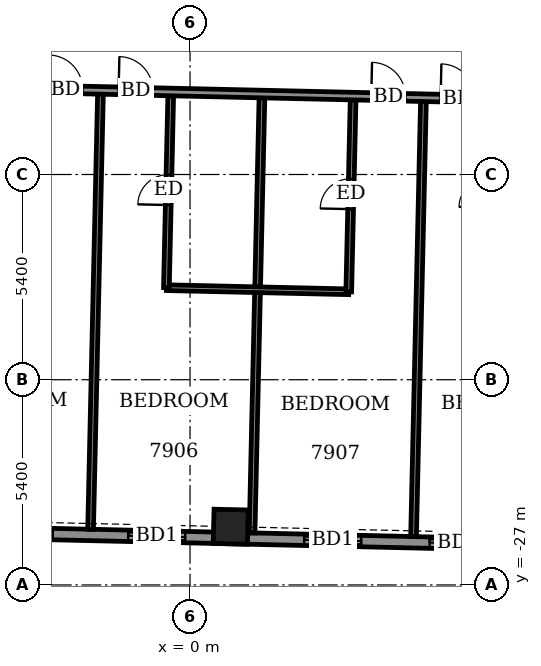
"""IFC4 building model, lengths in metres.
Left out: names, types, materials, properties, quantities, classifications, styles, units other than length and angle.
Written with IfcOpenShell. Run it as: python <this file> out.ifc"""

import sys

from ifc_helpers import new_model, si_unit, direction, frame, frame_2d, origin, origin_2d, place, context, subcontext, project, spatial, rectangle, extrude, element, fill, save


model = new_model("IFC4")
c1 = context("Model", 3, precision=1e-05, world=origin(), true_north=direction((0.0, 1.0)))
c2 = subcontext(c1, "Body", "Model", "MODEL_VIEW")
j1 = project(units=[si_unit("LENGTHUNIT", "METRE"), si_unit("PLANEANGLEUNIT", "RADIAN")], contexts=[c1])
p1 = place(None, origin())
s1 = spatial("IfcSite", under=j1, at=p1, CompositionType="ELEMENT")
p2 = place(p1, origin())
s2 = spatial("IfcBuilding", under=s1, at=p2, CompositionType="ELEMENT")
p3 = place(p2, frame((0.0, 0.0, 309.7)))
s3 = spatial("IfcBuildingStorey", under=s2, at=p3, CompositionType="ELEMENT", Elevation=309.7)
p4 = place(p3, frame((1.071, -25.467, -0.55), z_axis=(0.0, 0.0, 1.0), x_axis=(0.999741800516, -0.02272294656, 0.0)))
e1 = element("IfcColumn", 1, at=p4, inside=s3, PredefinedType="COLUMN", context=c2, shape_type="SweptSolid", body=[
    extrude(rectangle(XDim=0.9, YDim=0.9, at=origin_2d()), origin(), (0.0, 0.0, 1.0), 3.6),
])
p5 = place(p3, frame((-28.264, -25.102, 0.0), z_axis=(0.0, 0.0, 1.0), x_axis=(0.999742520573, -0.022691244094, 0.0)))
e2 = element("IfcWall", 2, at=p5, inside=s3, PredefinedType="SOLIDWALL", context=c2, shape_type="SweptSolid", body=[
    extrude(rectangle(XDim=51.3, YDim=0.3, at=frame_2d((25.65, 0.0))), origin(), (0.0, 0.0, 1.0), 2.5),
])
p6 = place(p5, frame((1.654, 0.0, 0.0)))
e3 = element("IfcOpeningElement", 3, at=p6, cuts=e2, PredefinedType="OPENING", context=c2, shape_type="SweptSolid", body=[
    extrude(rectangle(XDim=1.5, YDim=2.4, at=frame_2d((0.75, 1.2))), frame((0.0, 0.16, 0.0), z_axis=(0.0, -1.0, 0.0), x_axis=(1.0, 0.0, 0.0)), (0.0, 0.0, 1.0), 0.32),
])
p7 = place(p5, frame((4.936, 0.0, 0.0)))
e4 = element("IfcOpeningElement", 4, at=p7, cuts=e2, PredefinedType="OPENING", context=c2, shape_type="SweptSolid", body=[
    extrude(rectangle(XDim=1.5, YDim=2.4, at=frame_2d((0.75, 1.2))), frame((0.0, 0.16, 0.0), z_axis=(0.0, -1.0, 0.0), x_axis=(1.0, 0.0, 0.0)), (0.0, 0.0, 1.0), 0.32),
])
p8 = place(p5, frame((9.975, 0.0, 0.0)))
e5 = element("IfcOpeningElement", 5, at=p8, cuts=e2, PredefinedType="OPENING", context=c2, shape_type="SweptSolid", body=[
    extrude(rectangle(XDim=1.5, YDim=2.4, at=frame_2d((0.75, 1.2))), frame((0.0, 0.16, 0.0), z_axis=(0.0, -1.0, 0.0), x_axis=(1.0, 0.0, 0.0)), (0.0, 0.0, 1.0), 0.32),
])
p9 = place(p5, frame((15.196, 0.0, 0.0)))
e6 = element("IfcOpeningElement", 6, at=p9, cuts=e2, PredefinedType="OPENING", context=c2, shape_type="SweptSolid", body=[
    extrude(rectangle(XDim=1.5, YDim=2.4, at=frame_2d((0.75, 1.2))), frame((0.0, 0.16, 0.0), z_axis=(0.0, -1.0, 0.0), x_axis=(1.0, 0.0, 0.0)), (0.0, 0.0, 1.0), 0.32),
])
p10 = place(p5, frame((18.5, 0.0, 0.0)))
e7 = element("IfcOpeningElement", 7, at=p10, cuts=e2, PredefinedType="OPENING", context=c2, shape_type="SweptSolid", body=[
    extrude(rectangle(XDim=1.5, YDim=2.4, at=frame_2d((0.75, 1.2))), frame((0.0, 0.16, 0.0), z_axis=(0.0, -1.0, 0.0), x_axis=(1.0, 0.0, 0.0)), (0.0, 0.0, 1.0), 0.32),
])
p11 = place(p5, frame((23.157, 0.0, 0.0)))
e8 = element("IfcOpeningElement", 8, at=p11, cuts=e2, PredefinedType="OPENING", context=c2, shape_type="SweptSolid", body=[
    extrude(rectangle(XDim=1.5, YDim=2.4, at=frame_2d((0.75, 1.2))), frame((0.0, 0.16, 0.0), z_axis=(0.0, -1.0, 0.0), x_axis=(1.0, 0.0, 0.0)), (0.0, 0.0, 1.0), 0.32),
])
p12 = place(p5, frame((26.643, 0.0, 0.0)))
e9 = element("IfcOpeningElement", 9, at=p12, cuts=e2, PredefinedType="OPENING", context=c2, shape_type="SweptSolid", body=[
    extrude(rectangle(XDim=1.5, YDim=2.4, at=frame_2d((0.75, 1.2))), frame((0.0, 0.16, 0.0), z_axis=(0.0, -1.0, 0.0), x_axis=(1.0, 0.0, 0.0)), (0.0, 0.0, 1.0), 0.32),
])
p13 = place(p5, frame((31.275, 0.0, 0.0)))
e10 = element("IfcOpeningElement", 10, at=p13, cuts=e2, PredefinedType="OPENING", context=c2, shape_type="SweptSolid", body=[
    extrude(rectangle(XDim=1.5, YDim=2.4, at=frame_2d((0.75, 1.2))), frame((0.0, 0.16, 0.0), z_axis=(0.0, -1.0, 0.0), x_axis=(1.0, 0.0, 0.0)), (0.0, 0.0, 1.0), 0.32),
])
p14 = place(p5, frame((34.578, 0.0, 0.0)))
e11 = element("IfcOpeningElement", 11, at=p14, cuts=e2, PredefinedType="OPENING", context=c2, shape_type="SweptSolid", body=[
    extrude(rectangle(XDim=1.5, YDim=2.4, at=frame_2d((0.75, 1.2))), frame((0.0, 0.16, 0.0), z_axis=(0.0, -1.0, 0.0), x_axis=(1.0, 0.0, 0.0)), (0.0, 0.0, 1.0), 0.32),
])
p15 = place(p5, frame((39.75, 0.0, 0.0)))
e12 = element("IfcOpeningElement", 12, at=p15, cuts=e2, PredefinedType="OPENING", context=c2, shape_type="SweptSolid", body=[
    extrude(rectangle(XDim=1.5, YDim=2.4, at=frame_2d((0.75, 1.2))), frame((0.0, 0.16, 0.0), z_axis=(0.0, -1.0, 0.0), x_axis=(1.0, 0.0, 0.0)), (0.0, 0.0, 1.0), 0.32),
])
p16 = place(p5, frame((44.839, 0.0, 0.0)))
e13 = element("IfcOpeningElement", 13, at=p16, cuts=e2, PredefinedType="OPENING", context=c2, shape_type="SweptSolid", body=[
    extrude(rectangle(XDim=1.5, YDim=2.4, at=frame_2d((0.75, 1.2))), frame((0.0, 0.16, 0.0), z_axis=(0.0, -1.0, 0.0), x_axis=(1.0, 0.0, 0.0)), (0.0, 0.0, 1.0), 0.32),
])
p17 = place(p5, frame((47.628, 0.0, 0.9)))
e14 = element("IfcOpeningElement", 14, at=p17, cuts=e2, PredefinedType="OPENING", context=c2, shape_type="SweptSolid", body=[
    extrude(rectangle(XDim=2.4, YDim=1.5, at=frame_2d((1.2, 0.75))), frame((0.0, 0.16, 0.0), z_axis=(0.0, -1.0, 0.0), x_axis=(1.0, 0.0, 0.0)), (0.0, 0.0, 1.0), 0.32),
])
p18 = place(p3, frame((-2.617, -25.534, 0.0), z_axis=(0.0, 0.0, 1.0), x_axis=(0.022708327922, 0.999742132674, 0.0)))
e15 = element("IfcWall", 15, at=p18, inside=s3, PredefinedType="PARTITIONING", context=c2, shape_type="SweptSolid", body=[
    extrude(rectangle(XDim=11.45, YDim=0.15, at=frame_2d((5.725, 0.0))), origin(), (0.0, 0.0, 1.0), 2.5),
])
p19 = place(p3, frame((1.632, -25.63, 0.0), z_axis=(0.0, 0.0, 1.0), x_axis=(0.022708812003, 0.999742121678, 0.0)))
e16 = element("IfcWall", 16, at=p19, inside=s3, PredefinedType="PARTITIONING", context=c2, shape_type="SweptSolid", body=[
    extrude(rectangle(XDim=11.45, YDim=0.15, at=frame_2d((5.725, 0.0))), origin(), (0.0, 0.0, 1.0), 2.5),
])
p20 = place(p3, frame((5.881, -25.727, 0.0), z_axis=(0.0, 0.0, 1.0), x_axis=(0.022708327922, 0.999742132674, 0.0)))
e17 = element("IfcWall", 17, at=p20, inside=s3, PredefinedType="PARTITIONING", context=c2, shape_type="SweptSolid", body=[
    extrude(rectangle(XDim=11.45, YDim=0.15, at=frame_2d((5.725, 0.0))), origin(), (0.0, 0.0, 1.0), 2.5),
])
p21 = place(p3, frame((-0.622, -19.178, 0.0), z_axis=(0.0, 0.0, 1.0), x_axis=(0.999747191239, -0.022484519337, 0.0)))
e18 = element("IfcWall", 18, at=p21, inside=s3, PredefinedType="PARTITIONING", context=c2, shape_type="SweptSolid", body=[
    extrude(rectangle(XDim=4.799, YDim=0.15, at=frame_2d((2.4, 0.0))), origin(), (0.0, 0.0, 1.0), 3.05),
])
p22 = place(p3, frame((-0.622, -19.178, 0.0), z_axis=(0.0, 0.0, 1.0), x_axis=(0.02257535817, 0.999745144126, 0.0)))
e19 = element("IfcWall", 19, at=p22, inside=s3, PredefinedType="PARTITIONING", context=c2, shape_type="SweptSolid", body=[
    extrude(rectangle(XDim=5.05, YDim=0.15, at=frame_2d((2.525, 0.0))), origin(), (0.0, 0.0, 1.0), 3.05),
])
p23 = place(p22, frame((2.175, 0.0, 0.0)))
e20 = element("IfcOpeningElement", 20, at=p23, cuts=e19, PredefinedType="OPENING", context=c2, shape_type="SweptSolid", body=[
    extrude(rectangle(XDim=0.8, YDim=2.1, at=frame_2d((0.4, 1.05))), frame((0.0, 0.085, 0.0), z_axis=(0.0, -1.0, 0.0), x_axis=(1.0, 0.0, 0.0)), (0.0, 0.0, 1.0), 0.17),
])
p24 = place(p3, frame((4.176, -19.286, 0.0), z_axis=(0.0, 0.0, 1.0), x_axis=(0.022774126501, 0.999740635946, 0.0)))
e21 = element("IfcWall", 21, at=p24, inside=s3, PredefinedType="PARTITIONING", context=c2, shape_type="SweptSolid", body=[
    extrude(rectangle(XDim=5.049, YDim=0.15, at=frame_2d((2.524, 0.0))), origin(), (0.0, 0.0, 1.0), 3.05),
])
p25 = place(p24, frame((2.175, 0.0, 0.0)))
e22 = element("IfcOpeningElement", 22, at=p25, cuts=e21, PredefinedType="OPENING", context=c2, shape_type="SweptSolid", body=[
    extrude(rectangle(XDim=0.8, YDim=2.1, at=frame_2d((0.4, 1.05))), frame((0.0, 0.085, 0.0), z_axis=(0.0, -1.0, 0.0), x_axis=(1.0, 0.0, 0.0)), (0.0, 0.0, 1.0), 0.17),
])
p26 = place(p3, frame((-31.347, -13.329, 0.0), z_axis=(0.0, 0.0, 1.0), x_axis=(0.999742613079, -0.022687168058, 0.0)))
e23 = element("IfcWall", 23, at=p26, inside=s3, PredefinedType="PARTITIONING", context=c2, shape_type="SweptSolid", body=[
    extrude(rectangle(XDim=58.799, YDim=0.2, at=frame_2d((29.399, 0.0))), origin(), (0.0, 0.0, 1.0), 3.05),
])
p27 = place(p26, frame((1.35, 0.0, 0.0)))
e24 = element("IfcOpeningElement", 24, at=p27, cuts=e23, PredefinedType="OPENING", context=c2, shape_type="SweptSolid", body=[
    extrude(rectangle(XDim=1.0, YDim=2.1, at=frame_2d((0.5, 1.05))), frame((0.0, 0.11, 0.0), z_axis=(0.0, -1.0, 0.0), x_axis=(1.0, 0.0, 0.0)), (0.0, 0.0, 1.0), 0.22),
])
p28 = place(p26, frame((5.95, 0.0, 0.0)))
e25 = element("IfcOpeningElement", 25, at=p28, cuts=e23, PredefinedType="OPENING", context=c2, shape_type="SweptSolid", body=[
    extrude(rectangle(XDim=0.9, YDim=2.1, at=frame_2d((0.45, 1.05))), frame((0.0, 0.11, 0.0), z_axis=(0.0, -1.0, 0.0), x_axis=(1.0, 0.0, 0.0)), (0.0, 0.0, 1.0), 0.22),
])
p29 = place(p26, frame((10.575, 0.0, 0.0)))
e26 = element("IfcOpeningElement", 26, at=p29, cuts=e23, PredefinedType="OPENING", context=c2, shape_type="SweptSolid", body=[
    extrude(rectangle(XDim=0.9, YDim=2.1, at=frame_2d((0.45, 1.05))), frame((0.0, 0.11, 0.0), z_axis=(0.0, -1.0, 0.0), x_axis=(1.0, 0.0, 0.0)), (0.0, 0.0, 1.0), 0.22),
])
p30 = place(p26, frame((12.425, 0.0, 0.0)))
e27 = element("IfcOpeningElement", 27, at=p30, cuts=e23, PredefinedType="OPENING", context=c2, shape_type="SweptSolid", body=[
    extrude(rectangle(XDim=0.9, YDim=2.1, at=frame_2d((0.45, 1.05))), frame((0.0, 0.11, 0.0), z_axis=(0.0, -1.0, 0.0), x_axis=(1.0, 0.0, 0.0)), (0.0, 0.0, 1.0), 0.22),
])
p31 = place(p26, frame((19.075, 0.0, 0.0)))
e28 = element("IfcOpeningElement", 28, at=p31, cuts=e23, PredefinedType="OPENING", context=c2, shape_type="SweptSolid", body=[
    extrude(rectangle(XDim=0.9, YDim=2.1, at=frame_2d((0.45, 1.05))), frame((0.0, 0.11, 0.0), z_axis=(0.0, -1.0, 0.0), x_axis=(1.0, 0.0, 0.0)), (0.0, 0.0, 1.0), 0.22),
])
p32 = place(p26, frame((20.95, 0.0, 0.0)))
e29 = element("IfcOpeningElement", 29, at=p32, cuts=e23, PredefinedType="OPENING", context=c2, shape_type="SweptSolid", body=[
    extrude(rectangle(XDim=0.9, YDim=2.1, at=frame_2d((0.45, 1.05))), frame((0.0, 0.11, 0.0), z_axis=(0.0, -1.0, 0.0), x_axis=(1.0, 0.0, 0.0)), (0.0, 0.0, 1.0), 0.22),
])
p33 = place(p26, frame((27.625, 0.0, 0.0)))
e30 = element("IfcOpeningElement", 30, at=p33, cuts=e23, PredefinedType="OPENING", context=c2, shape_type="SweptSolid", body=[
    extrude(rectangle(XDim=0.9, YDim=2.1, at=frame_2d((0.45, 1.05))), frame((0.0, 0.11, 0.0), z_axis=(0.0, -1.0, 0.0), x_axis=(1.0, 0.0, 0.0)), (0.0, 0.0, 1.0), 0.22),
])
p34 = place(p26, frame((29.475, 0.0, 0.0)))
e31 = element("IfcOpeningElement", 31, at=p34, cuts=e23, PredefinedType="OPENING", context=c2, shape_type="SweptSolid", body=[
    extrude(rectangle(XDim=0.9, YDim=2.1, at=frame_2d((0.45, 1.05))), frame((0.0, 0.11, 0.0), z_axis=(0.0, -1.0, 0.0), x_axis=(1.0, 0.0, 0.0)), (0.0, 0.0, 1.0), 0.22),
])
p35 = place(p26, frame((36.125, 0.0, 0.0)))
e32 = element("IfcOpeningElement", 32, at=p35, cuts=e23, PredefinedType="OPENING", context=c2, shape_type="SweptSolid", body=[
    extrude(rectangle(XDim=0.9, YDim=2.1, at=frame_2d((0.45, 1.05))), frame((0.0, 0.11, 0.0), z_axis=(0.0, -1.0, 0.0), x_axis=(1.0, 0.0, 0.0)), (0.0, 0.0, 1.0), 0.22),
])
p36 = place(p26, frame((37.95, 0.0, 0.0)))
e33 = element("IfcOpeningElement", 33, at=p36, cuts=e23, PredefinedType="OPENING", context=c2, shape_type="SweptSolid", body=[
    extrude(rectangle(XDim=0.9, YDim=2.1, at=frame_2d((0.45, 1.05))), frame((0.0, 0.11, 0.0), z_axis=(0.0, -1.0, 0.0), x_axis=(1.0, 0.0, 0.0)), (0.0, 0.0, 1.0), 0.22),
])
p37 = place(p26, frame((44.6, 0.0, 0.0)))
e34 = element("IfcOpeningElement", 34, at=p37, cuts=e23, PredefinedType="OPENING", context=c2, shape_type="SweptSolid", body=[
    extrude(rectangle(XDim=0.9, YDim=2.1, at=frame_2d((0.45, 1.05))), frame((0.0, 0.11, 0.0), z_axis=(0.0, -1.0, 0.0), x_axis=(1.0, 0.0, 0.0)), (0.0, 0.0, 1.0), 0.22),
])
p38 = place(p26, frame((46.475, 0.0, 0.0)))
e35 = element("IfcOpeningElement", 35, at=p38, cuts=e23, PredefinedType="OPENING", context=c2, shape_type="SweptSolid", body=[
    extrude(rectangle(XDim=0.9, YDim=2.1, at=frame_2d((0.45, 1.05))), frame((0.0, 0.11, 0.0), z_axis=(0.0, -1.0, 0.0), x_axis=(1.0, 0.0, 0.0)), (0.0, 0.0, 1.0), 0.22),
])
p39 = place(p26, frame((55.925, 0.0, 0.0)))
e36 = element("IfcOpeningElement", 36, at=p39, cuts=e23, PredefinedType="OPENING", context=c2, shape_type="SweptSolid", body=[
    extrude(rectangle(XDim=1.0, YDim=2.1, at=frame_2d((0.5, 1.05))), frame((0.0, 0.11, 0.0), z_axis=(0.0, -1.0, 0.0), x_axis=(1.0, 0.0, 0.0)), (0.0, 0.0, 1.0), 0.22),
])
p40 = place(p26, frame((51.0, 0.0, 0.0)))
e37 = element("IfcOpeningElement", 37, at=p40, cuts=e23, PredefinedType="OPENING", context=c2, shape_type="SweptSolid", body=[
    extrude(rectangle(XDim=0.9, YDim=2.1, at=frame_2d((0.45, 1.05))), frame((0.0, 0.11, 0.0), z_axis=(0.0, -1.0, 0.0), x_axis=(1.0, 0.0, 0.0)), (0.0, 0.0, 1.0), 0.22),
])
p41 = place(p11, origin())
e38 = element("IfcDoor", 38, at=p41, inside=s3, OperationType="SLIDING_TO_LEFT", PredefinedType="DOOR", context=c2, shape_type="SweptSolid", body=[
    extrude(rectangle(XDim=1.5, YDim=2.4, at=frame_2d((0.75, 1.2))), frame((0.0, 0.025, 0.0), z_axis=(0.0, -1.0, 0.0), x_axis=(1.0, 0.0, 0.0)), (0.0, 0.0, 1.0), 0.05),
])
fill(e8, e38)
p42 = place(p12, origin())
e39 = element("IfcDoor", 39, at=p42, inside=s3, OperationType="SLIDING_TO_LEFT", PredefinedType="DOOR", context=c2, shape_type="SweptSolid", body=[
    extrude(rectangle(XDim=1.5, YDim=2.4, at=frame_2d((0.75, 1.2))), frame((0.0, 0.025, 0.0), z_axis=(0.0, -1.0, 0.0), x_axis=(1.0, 0.0, 0.0)), (0.0, 0.0, 1.0), 0.05),
])
fill(e9, e39)
p43 = place(p13, origin())
e40 = element("IfcDoor", 40, at=p43, inside=s3, OperationType="SLIDING_TO_LEFT", PredefinedType="DOOR", context=c2, shape_type="SweptSolid", body=[
    extrude(rectangle(XDim=1.5, YDim=2.4, at=frame_2d((0.75, 1.2))), frame((0.0, 0.025, 0.0), z_axis=(0.0, -1.0, 0.0), x_axis=(1.0, 0.0, 0.0)), (0.0, 0.0, 1.0), 0.05),
])
fill(e10, e40)
p44 = place(p14, origin())
e41 = element("IfcDoor", 41, at=p44, inside=s3, OperationType="SLIDING_TO_LEFT", PredefinedType="DOOR", context=c2, shape_type="SweptSolid", body=[
    extrude(rectangle(XDim=1.5, YDim=2.4, at=frame_2d((0.75, 1.2))), frame((0.0, 0.025, 0.0), z_axis=(0.0, -1.0, 0.0), x_axis=(1.0, 0.0, 0.0)), (0.0, 0.0, 1.0), 0.05),
])
fill(e11, e41)
p45 = place(p33, origin())
e42 = element("IfcDoor", 42, at=p45, inside=s3, OperationType="SINGLE_SWING_LEFT", PredefinedType="DOOR", context=c2, shape_type="SweptSolid", body=[
    extrude(rectangle(XDim=0.9, YDim=2.1, at=frame_2d((0.45, 1.05))), frame((0.0, 0.025, 0.0), z_axis=(0.0, -1.0, 0.0), x_axis=(1.0, 0.0, 0.0)), (0.0, 0.0, 1.0), 0.05),
])
fill(e30, e42)
p46 = place(p34, origin())
e43 = element("IfcDoor", 43, at=p46, inside=s3, OperationType="SINGLE_SWING_RIGHT", PredefinedType="DOOR", context=c2, shape_type="SweptSolid", body=[
    extrude(rectangle(XDim=0.9, YDim=2.1, at=frame_2d((0.45, 1.05))), frame((0.0, 0.025, 0.0), z_axis=(0.0, -1.0, 0.0), x_axis=(1.0, 0.0, 0.0)), (0.0, 0.0, 1.0), 0.05),
])
fill(e31, e43)
p47 = place(p23, origin())
e44 = element("IfcDoor", 44, at=p47, inside=s3, OperationType="SINGLE_SWING_RIGHT", PredefinedType="DOOR", context=c2, shape_type="SweptSolid", body=[
    extrude(rectangle(XDim=0.8, YDim=2.1, at=frame_2d((0.4, 1.05))), frame((0.0, 0.025, 0.0), z_axis=(0.0, -1.0, 0.0), x_axis=(1.0, 0.0, 0.0)), (0.0, 0.0, 1.0), 0.05),
])
fill(e20, e44)
p48 = place(p35, origin())
e45 = element("IfcDoor", 45, at=p48, inside=s3, OperationType="SINGLE_SWING_LEFT", PredefinedType="DOOR", context=c2, shape_type="SweptSolid", body=[
    extrude(rectangle(XDim=0.9, YDim=2.1, at=frame_2d((0.45, 1.05))), frame((0.0, 0.025, 0.0), z_axis=(0.0, -1.0, 0.0), x_axis=(1.0, 0.0, 0.0)), (0.0, 0.0, 1.0), 0.05),
])
fill(e32, e45)
p49 = place(p25, origin())
e46 = element("IfcDoor", 46, at=p49, inside=s3, OperationType="SINGLE_SWING_LEFT", PredefinedType="DOOR", context=c2, shape_type="SweptSolid", body=[
    extrude(rectangle(XDim=0.8, YDim=2.1, at=frame_2d((0.4, 1.05))), frame((0.0, 0.025, 0.0), z_axis=(0.0, -1.0, 0.0), x_axis=(1.0, 0.0, 0.0)), (0.0, 0.0, 1.0), 0.05),
])
fill(e22, e46)
p50 = place(p36, origin())
e47 = element("IfcDoor", 47, at=p50, inside=s3, OperationType="SINGLE_SWING_RIGHT", PredefinedType="DOOR", context=c2, shape_type="SweptSolid", body=[
    extrude(rectangle(XDim=0.9, YDim=2.1, at=frame_2d((0.45, 1.05))), frame((0.0, 0.025, 0.0), z_axis=(0.0, -1.0, 0.0), x_axis=(1.0, 0.0, 0.0)), (0.0, 0.0, 1.0), 0.05),
])
fill(e33, e47)
save(model, sys.argv[1])
